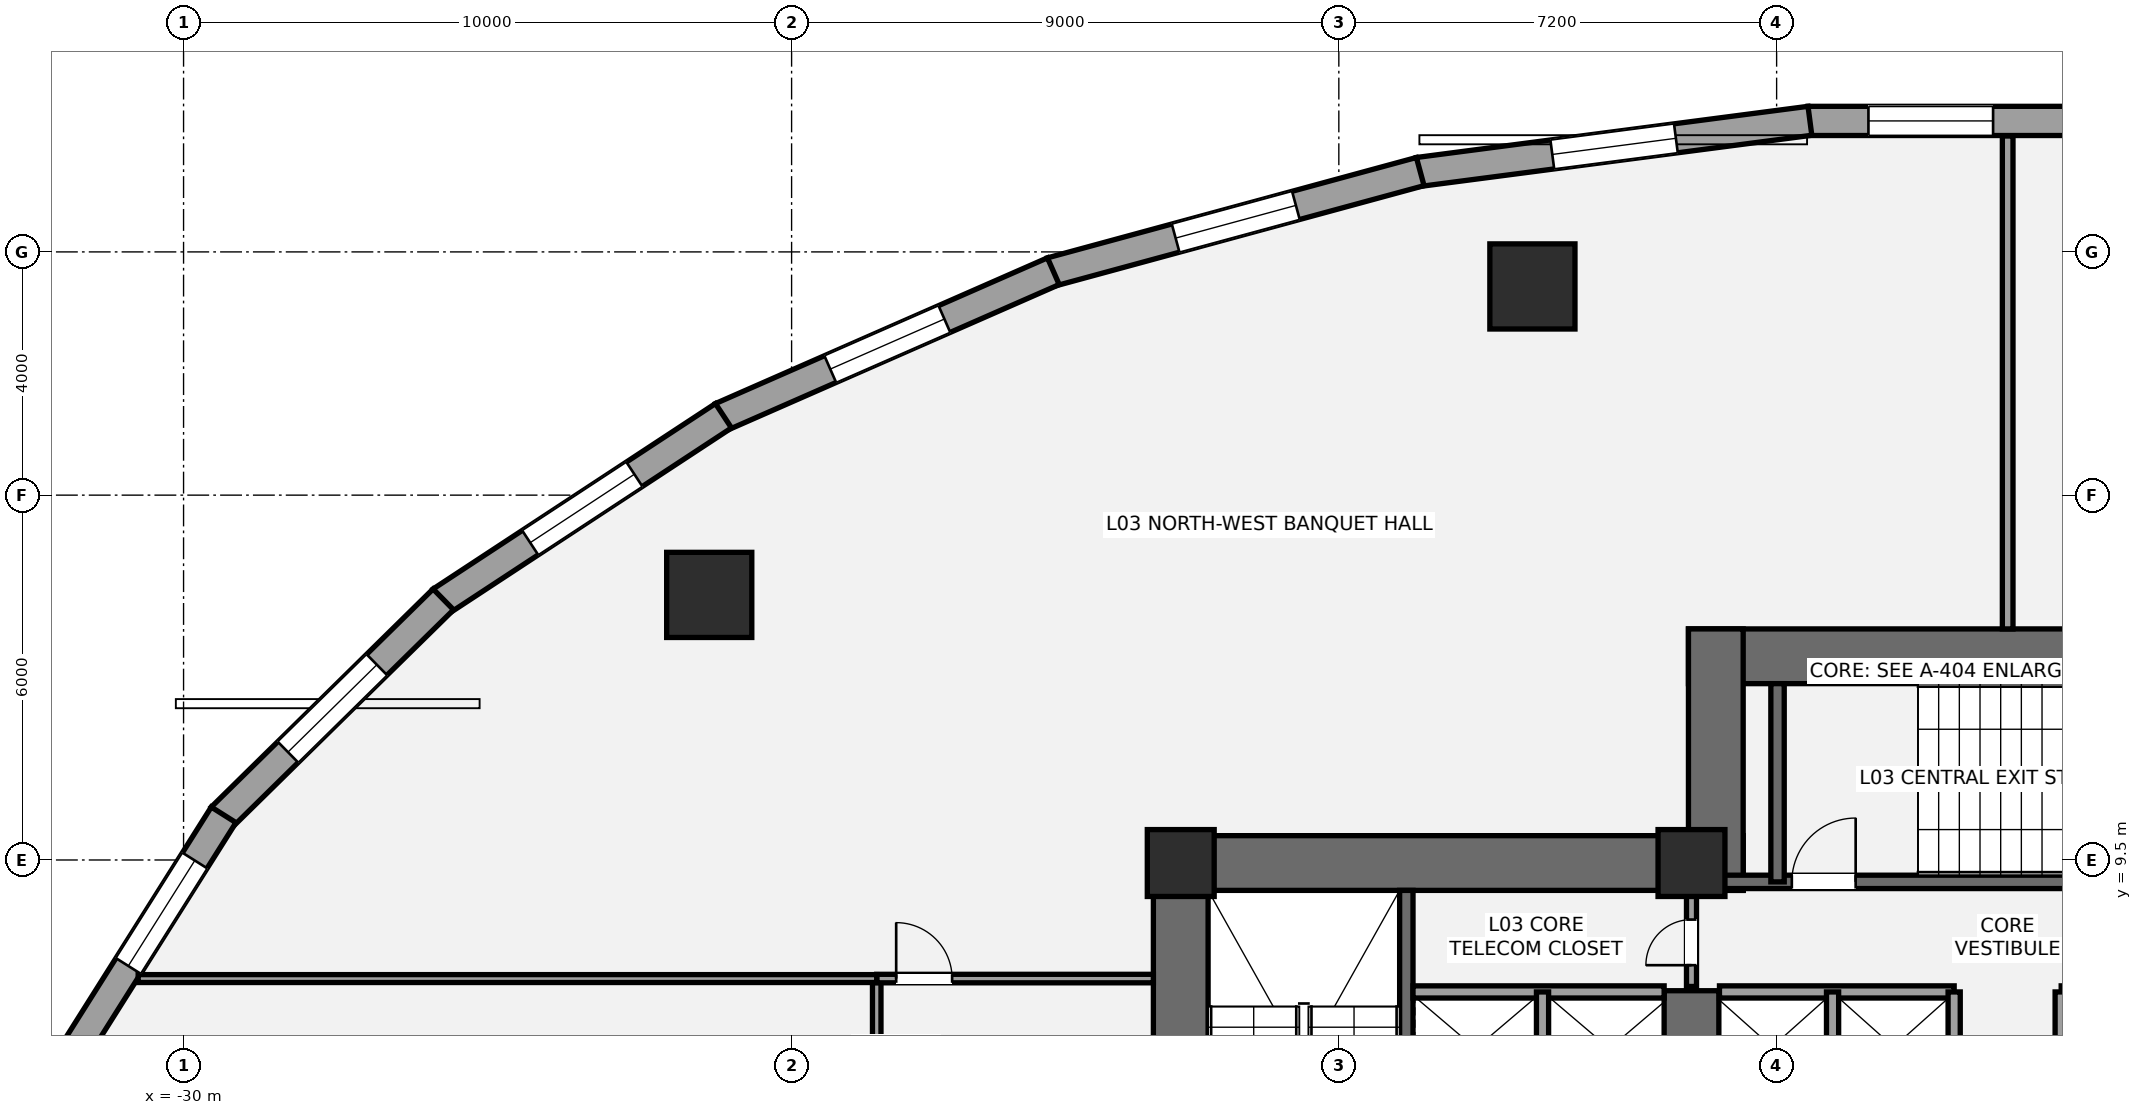
"""IFC4 building model, lengths in metres.
Left out: names, types, materials, properties, quantities, classifications, styles, units other than length and angle.
Written with IfcOpenShell. Run it as: python <this file> out.ifc"""

import sys

from ifc_helpers import new_model, si_unit, direction, frame, frame_2d, origin, origin_2d, place, context, subcontext, project, spatial, rectangle, hollow_circle, extrude, element, fill, save


model = new_model("IFC4")
c1 = context("Model", 3, precision=1e-05, world=origin(), true_north=direction((0.0, 1.0)))
c2 = subcontext(c1, "Body", "Model", "MODEL_VIEW")
j1 = project(units=[si_unit("LENGTHUNIT", "METRE"), si_unit("PLANEANGLEUNIT", "RADIAN")], contexts=[c1])
p1 = place(None, origin())
s1 = spatial("IfcSite", under=j1, at=p1, CompositionType="ELEMENT")
p2 = place(p1, origin())
s2 = spatial("IfcBuilding", under=s1, at=p2, CompositionType="ELEMENT")
p3 = place(p2, frame((0.0, 0.0, 14.4)))
s3 = spatial("IfcBuildingStorey", under=s2, at=p3, CompositionType="ELEMENT", Elevation=14.4)
p4 = place(p3, frame((-13.6, 0.95, 0.0), z_axis=(0.0, 0.0, 1.0), x_axis=(0.0, 1.0, 0.0)))
e1 = element("IfcWall", 1, at=p4, inside=s3, PredefinedType="SHEAR", context=c2, shape_type="SweptSolid", body=[
    extrude(rectangle(XDim=8.95, YDim=0.9, at=frame_2d((4.475, 0.0))), origin(), (0.0, 0.0, 1.0), 4.2),
])
p5 = place(p3, frame((-14.05, 9.45, 0.0), z_axis=(0.0, 0.0, 1.0), x_axis=(1.0, 0.0, 0.0)))
e2 = element("IfcWall", 2, at=p5, inside=s3, PredefinedType="SHEAR", context=c2, shape_type="SweptSolid", body=[
    extrude(rectangle(XDim=9.7, YDim=0.9, at=frame_2d((4.85, 0.0))), origin(), (0.0, 0.0, 1.0), 4.2),
])
p6 = place(p3, frame((-5.2, 5.35, 0.0), z_axis=(0.0, 0.0, 1.0), x_axis=(0.0, 1.0, 0.0)))
e3 = element("IfcWall", 3, at=p6, inside=s3, PredefinedType="SHEAR", context=c2, shape_type="SweptSolid", body=[
    extrude(rectangle(XDim=2.0, YDim=0.9, at=frame_2d((1.0, 0.0))), origin(), (0.0, 0.0, 1.0), 4.2),
])
p7 = place(p3, frame((-9.89, 1.85, 0.0), z_axis=(0.0, 0.0, 1.0), x_axis=(0.0, 1.0, 0.0)))
e4 = element("IfcWall", 4, at=p7, inside=s3, PredefinedType="SHEAR", context=c2, shape_type="SweptSolid", body=[
    extrude(rectangle(XDim=7.15, YDim=0.22, at=frame_2d((3.575, 0.0))), origin(), (0.0, 0.0, 1.0), 4.2),
])
p8 = place(p3, frame((-5.25, 12.85, 0.0), z_axis=(0.0, 0.0, 1.0), x_axis=(1.0, 0.0, 0.0)))
e5 = element("IfcWall", 5, at=p8, inside=s3, PredefinedType="SHEAR", context=c2, shape_type="SweptSolid", body=[
    extrude(rectangle(XDim=10.5, YDim=0.9, at=frame_2d((5.25, 0.0))), origin(), (0.0, 0.0, 1.0), 4.2),
])
p9 = place(p3, frame((-4.8, 9.0, 0.0), z_axis=(0.0, 0.0, 1.0), x_axis=(0.0, 1.0, 0.0)))
e6 = element("IfcWall", 6, at=p9, inside=s3, PredefinedType="SHEAR", context=c2, shape_type="SweptSolid", body=[
    extrude(rectangle(XDim=4.3, YDim=0.9, at=frame_2d((2.15, 0.0))), origin(), (0.0, 0.0, 1.0), 4.2),
])
p10 = place(p3, frame((-4.7, 9.14, 0.0), z_axis=(0.0, 0.0, 1.0), x_axis=(1.0, 0.0, 0.0)))
e7 = element("IfcWall", 7, at=p10, inside=s3, PredefinedType="SHEAR", context=c2, shape_type="SweptSolid", body=[
    extrude(rectangle(XDim=9.3, YDim=0.22, at=frame_2d((4.65, 0.0))), origin(), (0.0, 0.0, 1.0), 4.2),
])
p11 = place(p10, frame((1.15, 0.0, 0.0)))
e8 = element("IfcOpeningElement", 8, at=p11, cuts=e7, PredefinedType="OPENING", context=c2, shape_type="SweptSolid", body=[
    extrude(rectangle(XDim=1.05, YDim=2.15, at=frame_2d((0.525, 1.075))), frame((0.0, 0.12, 0.0), z_axis=(0.0, -1.0, 0.0), x_axis=(1.0, 0.0, 0.0)), (0.0, 0.0, 1.0), 0.24),
])
p12 = place(p3, frame((-3.785, 9.14, 0.0), z_axis=(0.0, 0.0, 1.0), x_axis=(0.0, 1.0, 0.0)))
e9 = element("IfcWall", 9, at=p12, inside=s3, PredefinedType="SHEAR", context=c2, shape_type="SweptSolid", body=[
    extrude(rectangle(XDim=3.26, YDim=0.22, at=frame_2d((1.63, 0.0))), origin(), (0.0, 0.0, 1.0), 4.2),
])
for number, where, z_axis, x_axis in (
    (10, (-13.6, 9.45, 0.0), (0.0, 0.0, 1.0), (1.0, 0.0, 0.0)),
    (11, (-5.2, 9.45, 0.0), (0.0, 0.0, 1.0), (1.0, 0.0, 0.0)),
):
    element("IfcColumn", number, at=place(p3, frame(where, z_axis=z_axis, x_axis=x_axis)), inside=s3, PredefinedType="COLUMN", context=c2, shape_type="SweptSolid", body=[
        extrude(rectangle(XDim=1.1, YDim=1.1, at=origin_2d()), origin(), (0.0, 0.0, 1.0), 4.2),
    ])
for number, where, z_axis, x_axis in (
    (12, (-7.816, 18.932, 0.0), (0.0, 0.0, 1.0), (1.0, 0.0, 0.0)),
    (13, (-21.354, 13.859, 0.0), (0.0, 0.0, 1.0), (1.0, 0.0, 0.0)),
):
    element("IfcColumn", number, at=place(p3, frame(where, z_axis=z_axis, x_axis=x_axis)), inside=s3, PredefinedType="USERDEFINED", context=c2, shape_type="SweptSolid", body=[
        extrude(hollow_circle(Radius=0.7, WallThickness=0.05, at=origin_2d()), origin(), (0.0, 0.0, 1.0), 4.2),
    ])
p13 = place(p3, frame((-3.284, 21.654, 0.0), z_axis=(0.0, 0.0, 1.0), x_axis=(1.0, 0.0, 0.0)))
e14 = element("IfcWall", 14, at=p13, inside=s3, PredefinedType="STANDARD", context=c2, shape_type="SweptSolid", body=[
    extrude(rectangle(XDim=6.567, YDim=0.48, at=frame_2d((3.284, 0.0))), origin(), (0.0, 0.0, 1.0), 3.109),
])
p14 = place(p13, frame((0.994, 0.0, 0.72)))
e15 = element("IfcOpeningElement", 15, at=p14, cuts=e14, PredefinedType="OPENING", context=c2, shape_type="SweptSolid", body=[
    extrude(rectangle(XDim=2.05, YDim=1.8, at=frame_2d((1.025, 0.9))), frame((0.0, 0.25, 0.0), z_axis=(0.0, -1.0, 0.0), x_axis=(1.0, 0.0, 0.0)), (0.0, 0.0, 1.0), 0.5),
])
p15 = place(p3, frame((-9.693, 20.815, 0.0), z_axis=(0.0, 0.0, 1.0), x_axis=(0.991576921472, 0.129519144545, 0.0)))
e16 = element("IfcWall", 16, at=p15, inside=s3, PredefinedType="STANDARD", context=c2, shape_type="SweptSolid", body=[
    extrude(rectangle(XDim=6.496, YDim=0.48, at=frame_2d((3.248, 0.0))), origin(), (0.0, 0.0, 1.0), 3.109),
])
p16 = place(p15, frame((2.223, 0.0, 0.72)))
e17 = element("IfcOpeningElement", 17, at=p16, cuts=e16, PredefinedType="OPENING", context=c2, shape_type="SweptSolid", body=[
    extrude(rectangle(XDim=2.05, YDim=1.8, at=frame_2d((1.025, 0.9))), frame((0.0, 0.25, 0.0), z_axis=(0.0, -1.0, 0.0), x_axis=(1.0, 0.0, 0.0)), (0.0, 0.0, 1.0), 0.5),
])
p17 = place(p3, frame((-15.729, 19.171, 0.0), z_axis=(0.0, 0.0, 1.0), x_axis=(0.964936550718, 0.262483243445, 0.0)))
e18 = element("IfcWall", 18, at=p17, inside=s3, PredefinedType="STANDARD", context=c2, shape_type="SweptSolid", body=[
    extrude(rectangle(XDim=6.288, YDim=0.48, at=frame_2d((3.144, 0.0))), origin(), (0.0, 0.0, 1.0), 3.109),
])
p18 = place(p17, frame((2.119, 0.0, 0.72)))
e19 = element("IfcOpeningElement", 19, at=p18, cuts=e18, PredefinedType="OPENING", context=c2, shape_type="SweptSolid", body=[
    extrude(rectangle(XDim=2.05, YDim=1.8, at=frame_2d((1.025, 0.9))), frame((0.0, 0.25, 0.0), z_axis=(0.0, -1.0, 0.0), x_axis=(1.0, 0.0, 0.0)), (0.0, 0.0, 1.0), 0.5),
])
p19 = place(p3, frame((-21.156, 16.786, 0.0), z_axis=(0.0, 0.0, 1.0), x_axis=(0.91570760638, 0.401845218484, 0.0)))
e20 = element("IfcWall", 20, at=p19, inside=s3, PredefinedType="STANDARD", context=c2, shape_type="SweptSolid", body=[
    extrude(rectangle(XDim=5.963, YDim=0.48, at=frame_2d((2.981, 0.0))), origin(), (0.0, 0.0, 1.0), 3.109),
])
p20 = place(p19, frame((1.957, 0.0, 0.72)))
e21 = element("IfcOpeningElement", 21, at=p20, cuts=e20, PredefinedType="OPENING", context=c2, shape_type="SweptSolid", body=[
    extrude(rectangle(XDim=2.05, YDim=1.8, at=frame_2d((1.025, 0.9))), frame((0.0, 0.25, 0.0), z_axis=(0.0, -1.0, 0.0), x_axis=(1.0, 0.0, 0.0)), (0.0, 0.0, 1.0), 0.5),
])
p21 = place(p3, frame((-25.764, 13.756, 0.0), z_axis=(0.0, 0.0, 1.0), x_axis=(0.835863918172, 0.548936708827, 0.0)))
e22 = element("IfcWall", 22, at=p21, inside=s3, PredefinedType="STANDARD", context=c2, shape_type="SweptSolid", body=[
    extrude(rectangle(XDim=5.555, YDim=0.48, at=frame_2d((2.778, 0.0))), origin(), (0.0, 0.0, 1.0), 3.109),
])
p22 = place(p21, frame((1.753, 0.0, 0.72)))
e23 = element("IfcOpeningElement", 23, at=p22, cuts=e22, PredefinedType="OPENING", context=c2, shape_type="SweptSolid", body=[
    extrude(rectangle(XDim=2.05, YDim=1.8, at=frame_2d((1.025, 0.9))), frame((0.0, 0.25, 0.0), z_axis=(0.0, -1.0, 0.0), x_axis=(1.0, 0.0, 0.0)), (0.0, 0.0, 1.0), 0.5),
])
p23 = place(p3, frame((-29.376, 10.199, 0.0), z_axis=(0.0, 0.0, 1.0), x_axis=(0.713189080178, 0.700971708355, 0.0)))
e24 = element("IfcWall", 24, at=p23, inside=s3, PredefinedType="STANDARD", context=c2, shape_type="SweptSolid", body=[
    extrude(rectangle(XDim=5.116, YDim=0.48, at=frame_2d((2.558, 0.0))), origin(), (0.0, 0.0, 1.0), 3.109),
])
p24 = place(p23, frame((1.533, 0.0, 0.72)))
e25 = element("IfcOpeningElement", 25, at=p24, cuts=e24, PredefinedType="OPENING", context=c2, shape_type="SweptSolid", body=[
    extrude(rectangle(XDim=2.05, YDim=1.8, at=frame_2d((1.025, 0.9))), frame((0.0, 0.25, 0.0), z_axis=(0.0, -1.0, 0.0), x_axis=(1.0, 0.0, 0.0)), (0.0, 0.0, 1.0), 0.5),
])
p25 = place(p3, frame((-31.854, 6.258, 0.0), z_axis=(0.0, 0.0, 1.0), x_axis=(0.53349762721, 0.845801561693, 0.0)))
e26 = element("IfcWall", 26, at=p25, inside=s3, PredefinedType="STANDARD", context=c2, shape_type="SweptSolid", body=[
    extrude(rectangle(XDim=4.711, YDim=0.48, at=frame_2d((2.355, 0.0))), origin(), (0.0, 0.0, 1.0), 3.109),
])
p26 = place(p25, frame((1.773, 0.0, 0.72)))
e27 = element("IfcOpeningElement", 27, at=p26, cuts=e26, PredefinedType="OPENING", context=c2, shape_type="SweptSolid", body=[
    extrude(rectangle(XDim=2.05, YDim=1.8, at=frame_2d((1.025, 0.9))), frame((0.0, 0.25, 0.0), z_axis=(0.0, -1.0, 0.0), x_axis=(1.0, 0.0, 0.0)), (0.0, 0.0, 1.0), 0.5),
])
p27 = place(p3, frame((-9.78, 7.33, 0.0), z_axis=(0.0, 0.0, 1.0), x_axis=(1.0, 0.0, 0.0)))
e28 = element("IfcWall", 28, at=p27, inside=s3, PredefinedType="SOLIDWALL", context=c2, shape_type="SweptSolid", body=[
    extrude(rectangle(XDim=4.13, YDim=0.2, at=frame_2d((2.065, 0.0))), origin(), (0.0, 0.0, 1.0), 3.98),
])
p28 = place(p3, frame((-7.65, 5.47, 0.0), z_axis=(0.0, 0.0, 1.0), x_axis=(0.0, 1.0, 0.0)))
e29 = element("IfcWall", 29, at=p28, inside=s3, PredefinedType="SOLIDWALL", context=c2, shape_type="SweptSolid", body=[
    extrude(rectangle(XDim=1.86, YDim=0.2, at=frame_2d((0.93, 0.0))), origin(), (0.0, 0.0, 1.0), 3.98),
])
for number, where, z_axis, x_axis in (
    (30, (-4.74, 7.33, 0.0), (0.0, 0.0, 1.0), (1.0, 0.0, 0.0)),
    (31, (0.88, 7.33, 0.0), (0.0, 0.0, 1.0), (1.0, 0.0, 0.0)),
):
    element("IfcWall", number, at=place(p3, frame(where, z_axis=z_axis, x_axis=x_axis)), inside=s3, PredefinedType="SOLIDWALL", context=c2, shape_type="SweptSolid", body=[
        extrude(rectangle(XDim=3.86, YDim=0.2, at=frame_2d((1.93, 0.0))), origin(), (0.0, 0.0, 1.0), 3.98),
    ])
for number, where, z_axis, x_axis in (
    (32, (-2.88, 5.52, 0.0), (0.0, 0.0, 1.0), (0.0, 1.0, 0.0)),
    (33, (-0.88, 5.52, 0.0), (0.0, 0.0, 1.0), (0.0, 1.0, 0.0)),
    (34, (0.88, 5.52, 0.0), (0.0, 0.0, 1.0), (0.0, 1.0, 0.0)),
):
    element("IfcWall", number, at=place(p3, frame(where, z_axis=z_axis, x_axis=x_axis)), inside=s3, PredefinedType="SOLIDWALL", context=c2, shape_type="SweptSolid", body=[
        extrude(rectangle(XDim=1.81, YDim=0.2, at=frame_2d((0.905, 0.0))), origin(), (0.0, 0.0, 1.0), 3.98),
    ])
p29 = place(p3, frame((-5.2, 7.42, 0.0), z_axis=(0.0, 0.0, 1.0), x_axis=(0.0, 1.0, 0.0)))
e35 = element("IfcWall", 35, at=p29, inside=s3, PredefinedType="PARTITIONING", context=c2, shape_type="SweptSolid", body=[
    extrude(rectangle(XDim=1.58, YDim=0.165, at=frame_2d((0.79, 0.0))), origin(), (0.0, 0.0, 1.0), 3.98),
])
p30 = place(p29, frame((0.35, 0.0, 0.0)))
e36 = element("IfcOpeningElement", 36, at=p30, cuts=e35, PredefinedType="OPENING", context=c2, shape_type="SweptSolid", body=[
    extrude(rectangle(XDim=0.75, YDim=2.1, at=frame_2d((0.375, 1.05))), frame((0.0, 0.093, 0.0), z_axis=(0.0, -1.0, 0.0), x_axis=(1.0, 0.0, 0.0)), (0.0, 0.0, 1.0), 0.185),
])
p31 = place(p3, frame((-18.6, -17.637, 0.0), z_axis=(0.0, 0.0, 1.0), x_axis=(0.0, 1.0, 0.0)))
e37 = element("IfcWall", 37, at=p31, inside=s3, PredefinedType="PARTITIONING", context=c2, shape_type="SweptSolid", body=[
    extrude(rectangle(XDim=25.187, YDim=0.14, at=frame_2d((12.594, 0.0))), origin(), (0.0, 0.0, 1.0), 3.348),
])
p32 = place(p31, frame((14.487, 0.0, 0.0)))
e38 = element("IfcOpeningElement", 38, at=p32, cuts=e37, PredefinedType="OPENING", context=c2, shape_type="SweptSolid", body=[
    extrude(rectangle(XDim=0.9, YDim=2.1, at=frame_2d((0.45, 1.05))), frame((0.0, 0.08, 0.0), z_axis=(0.0, -1.0, 0.0), x_axis=(1.0, 0.0, 0.0)), (0.0, 0.0, 1.0), 0.16),
])
p33 = place(p31, frame((21.862, 0.0, 0.0)))
e39 = element("IfcOpeningElement", 39, at=p33, cuts=e37, PredefinedType="OPENING", context=c2, shape_type="SweptSolid", body=[
    extrude(rectangle(XDim=0.9, YDim=2.1, at=frame_2d((0.45, 1.05))), frame((0.0, 0.08, 0.0), z_axis=(0.0, -1.0, 0.0), x_axis=(1.0, 0.0, 0.0)), (0.0, 0.0, 1.0), 0.16),
])
p34 = place(p3, frame((-18.6, 7.55, 0.0), z_axis=(0.0, 0.0, 1.0), x_axis=(1.0, 0.0, 0.0)))
e40 = element("IfcWall", 40, at=p34, inside=s3, PredefinedType="PARTITIONING", context=c2, shape_type="SweptSolid", body=[
    extrude(rectangle(XDim=4.55, YDim=0.14, at=frame_2d((2.275, 0.0))), origin(), (0.0, 0.0, 1.0), 3.433),
])
p35 = place(p34, frame((0.32, 0.0, 0.0)))
e41 = element("IfcOpeningElement", 41, at=p35, cuts=e40, PredefinedType="OPENING", context=c2, shape_type="SweptSolid", body=[
    extrude(rectangle(XDim=0.92, YDim=2.15, at=frame_2d((0.46, 1.075))), frame((0.0, 0.08, 0.0), z_axis=(0.0, -1.0, 0.0), x_axis=(1.0, 0.0, 0.0)), (0.0, 0.0, 1.0), 0.16),
])
p36 = place(p3, frame((0.0, 13.3, 0.0), z_axis=(0.0, 0.0, 1.0), x_axis=(0.0, 1.0, 0.0)))
e42 = element("IfcWall", 42, at=p36, inside=s3, PredefinedType="PARTITIONING", context=c2, shape_type="SweptSolid", body=[
    extrude(rectangle(XDim=8.106, YDim=0.175, at=frame_2d((4.053, 0.0))), origin(), (0.0, 0.0, 1.0), 3.98),
])
p37 = place(p3, frame((-30.747, 7.55, 0.0), z_axis=(0.0, 0.0, 1.0), x_axis=(1.0, 0.0, 0.0)))
e43 = element("IfcWall", 43, at=p37, inside=s3, PredefinedType="PARTITIONING", context=c2, shape_type="SweptSolid", body=[
    extrude(rectangle(XDim=12.146, YDim=0.13, at=frame_2d((6.073, 0.0))), origin(), (0.0, 0.0, 1.0), 2.958),
])
p38 = place(p14, origin())
e44 = element("IfcWindow", 44, at=p38, inside=s3, PartitioningType="SINGLE_PANEL", PredefinedType="WINDOW", context=c2, shape_type="SweptSolid", body=[
    extrude(rectangle(XDim=2.05, YDim=1.8, at=frame_2d((1.025, 0.9))), frame((0.0, -0.01, 0.0), z_axis=(0.0, -1.0, 0.0), x_axis=(1.0, 0.0, 0.0)), (0.0, 0.0, 1.0), 0.06),
])
fill(e15, e44)
p39 = place(p16, origin())
e45 = element("IfcWindow", 45, at=p39, inside=s3, PartitioningType="SINGLE_PANEL", PredefinedType="WINDOW", context=c2, shape_type="SweptSolid", body=[
    extrude(rectangle(XDim=2.05, YDim=1.8, at=frame_2d((1.025, 0.9))), frame((0.0, -0.01, 0.0), z_axis=(0.0, -1.0, 0.0), x_axis=(1.0, 0.0, 0.0)), (0.0, 0.0, 1.0), 0.06),
])
fill(e17, e45)
p40 = place(p18, origin())
e46 = element("IfcWindow", 46, at=p40, inside=s3, PartitioningType="SINGLE_PANEL", PredefinedType="WINDOW", context=c2, shape_type="SweptSolid", body=[
    extrude(rectangle(XDim=2.05, YDim=1.8, at=frame_2d((1.025, 0.9))), frame((0.0, -0.01, 0.0), z_axis=(0.0, -1.0, 0.0), x_axis=(1.0, 0.0, 0.0)), (0.0, 0.0, 1.0), 0.06),
])
fill(e19, e46)
p41 = place(p20, origin())
e47 = element("IfcWindow", 47, at=p41, inside=s3, PartitioningType="SINGLE_PANEL", PredefinedType="WINDOW", context=c2, shape_type="SweptSolid", body=[
    extrude(rectangle(XDim=2.05, YDim=1.8, at=frame_2d((1.025, 0.9))), frame((0.0, -0.01, 0.0), z_axis=(0.0, -1.0, 0.0), x_axis=(1.0, 0.0, 0.0)), (0.0, 0.0, 1.0), 0.06),
])
fill(e21, e47)
p42 = place(p22, origin())
e48 = element("IfcWindow", 48, at=p42, inside=s3, PartitioningType="SINGLE_PANEL", PredefinedType="WINDOW", context=c2, shape_type="SweptSolid", body=[
    extrude(rectangle(XDim=2.05, YDim=1.8, at=frame_2d((1.025, 0.9))), frame((0.0, -0.01, 0.0), z_axis=(0.0, -1.0, 0.0), x_axis=(1.0, 0.0, 0.0)), (0.0, 0.0, 1.0), 0.06),
])
fill(e23, e48)
p43 = place(p24, origin())
e49 = element("IfcWindow", 49, at=p43, inside=s3, PartitioningType="SINGLE_PANEL", PredefinedType="WINDOW", context=c2, shape_type="SweptSolid", body=[
    extrude(rectangle(XDim=2.05, YDim=1.8, at=frame_2d((1.025, 0.9))), frame((0.0, -0.01, 0.0), z_axis=(0.0, -1.0, 0.0), x_axis=(1.0, 0.0, 0.0)), (0.0, 0.0, 1.0), 0.06),
])
fill(e25, e49)
p44 = place(p26, origin())
e50 = element("IfcWindow", 50, at=p44, inside=s3, PartitioningType="SINGLE_PANEL", PredefinedType="WINDOW", context=c2, shape_type="SweptSolid", body=[
    extrude(rectangle(XDim=2.05, YDim=1.8, at=frame_2d((1.025, 0.9))), frame((0.0, -0.01, 0.0), z_axis=(0.0, -1.0, 0.0), x_axis=(1.0, 0.0, 0.0)), (0.0, 0.0, 1.0), 0.06),
])
fill(e27, e50)
p45 = place(p11, origin())
e51 = element("IfcDoor", 51, at=p45, inside=s3, OperationType="SINGLE_SWING_RIGHT", PredefinedType="DOOR", context=c2, shape_type="SweptSolid", body=[
    extrude(rectangle(XDim=1.05, YDim=2.15, at=frame_2d((0.525, 1.075))), frame((0.0, 0.025, 0.0), z_axis=(0.0, -1.0, 0.0), x_axis=(1.0, 0.0, 0.0)), (0.0, 0.0, 1.0), 0.05),
])
fill(e8, e51)
p46 = place(p30, origin())
e52 = element("IfcDoor", 52, at=p46, inside=s3, OperationType="SINGLE_SWING_LEFT", PredefinedType="DOOR", context=c2, shape_type="SweptSolid", body=[
    extrude(rectangle(XDim=0.75, YDim=2.1, at=frame_2d((0.375, 1.05))), frame((0.0, 0.025, 0.0), z_axis=(0.0, -1.0, 0.0), x_axis=(1.0, 0.0, 0.0)), (0.0, 0.0, 1.0), 0.05),
])
fill(e36, e52)
p47 = place(p35, origin())
e53 = element("IfcDoor", 53, at=p47, inside=s3, OperationType="SINGLE_SWING_LEFT", PredefinedType="DOOR", context=c2, shape_type="SweptSolid", body=[
    extrude(rectangle(XDim=0.92, YDim=2.15, at=frame_2d((0.46, 1.075))), frame((0.0, 0.025, 0.0), z_axis=(0.0, -1.0, 0.0), x_axis=(1.0, 0.0, 0.0)), (0.0, 0.0, 1.0), 0.05),
])
fill(e41, e53)
save(model, sys.argv[1])
